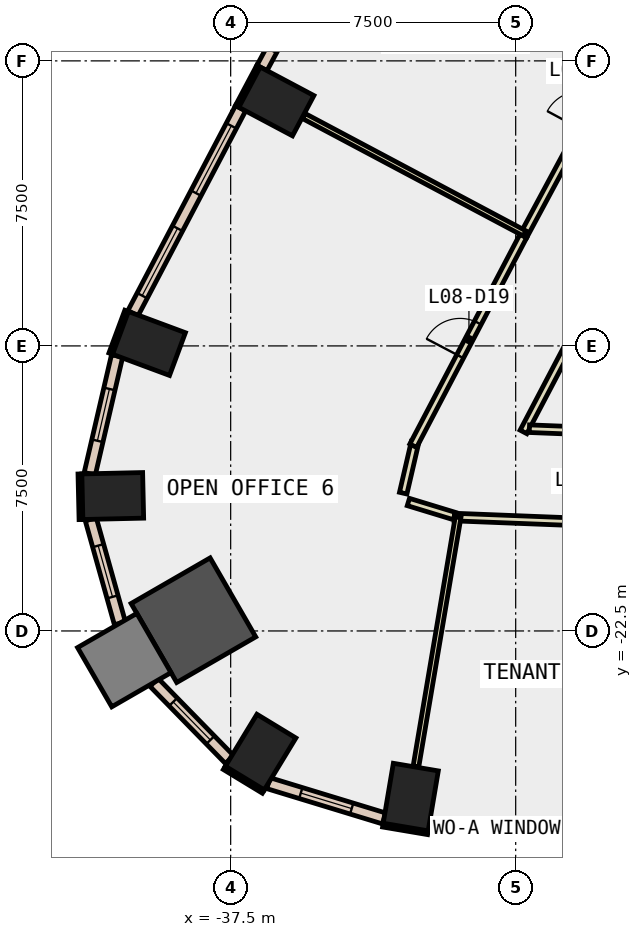
"""IFC4 building model, lengths in metres.
Left out: names, types, materials, properties, quantities, classifications, styles, units other than length and angle.
Written with IfcOpenShell. Run it as: python <this file> out.ifc"""

import sys

from ifc_helpers import new_model, si_unit, direction, frame, frame_2d, origin, origin_2d, place, context, subcontext, project, spatial, rectangle, extrude, element, fill, save


model = new_model("IFC4")
c1 = context("Model", 3, precision=1e-05, world=origin(), true_north=direction((0.0, 1.0)))
c2 = subcontext(c1, "Body", "Model", "MODEL_VIEW")
j1 = project(units=[si_unit("LENGTHUNIT", "METRE"), si_unit("PLANEANGLEUNIT", "RADIAN")], contexts=[c1])
p1 = place(None, origin())
s1 = spatial("IfcSite", under=j1, at=p1, CompositionType="ELEMENT")
p2 = place(p1, origin())
s2 = spatial("IfcBuilding", under=s1, at=p2, CompositionType="ELEMENT")
p3 = place(p2, frame((0.0, 0.0, 43.4)))
s3 = spatial("IfcBuildingStorey", under=s2, at=p3, CompositionType="ELEMENT", Elevation=43.4)
for number, where, z_axis, x_axis in (
    (1, (-32.761, -26.871, -0.4), (0.0, 0.0, 1.0), (-0.986, 0.167, 0.0)),
    (2, (-36.298, -8.567, -0.4), (0.0, 0.0, 1.0), (0.469, 0.883, 0.0)),
    (3, (-39.65, -14.936, -0.4), (0.0, 0.0, 1.0), (0.348, 0.937, 0.0)),
    (4, (-40.603, -18.95, -0.4), (0.0, 0.0, 1.0), (-0.023, 1.0, 0.0)),
):
    element("IfcColumn", number, at=place(p3, frame(where, z_axis=z_axis, x_axis=x_axis)), inside=s3, PredefinedType="COLUMN", context=c2, shape_type="SweptSolid", body=[
        extrude(rectangle(XDim=1.2, YDim=1.6, at=origin_2d()), origin(), (0.0, 0.0, 1.0), 4.2),
    ])
p4 = place(p3, frame((-38.48, -22.217, -0.4), z_axis=(0.0, 0.0, 1.0), x_axis=(0.866025403784, 0.5, 0.0)))
e5 = element("IfcColumn", 5, at=p4, inside=s3, PredefinedType="COLUMN", context=c2, shape_type="SweptSolid", body=[
    extrude(rectangle(XDim=2.4, YDim=2.4, at=origin_2d()), origin(), (0.0, 0.0, 1.0), 4.2),
])
p5 = place(p3, frame((-36.712, -25.688, -0.4), z_axis=(0.0, 0.0, 1.0), x_axis=(-0.854522294989, 0.519414716163, 0.0)))
e6 = element("IfcColumn", 6, at=p5, inside=s3, PredefinedType="COLUMN", context=c2, shape_type="SweptSolid", body=[
    extrude(rectangle(XDim=1.2, YDim=1.6, at=origin_2d()), origin(), (0.0, 0.0, 1.0), 4.2),
])
p6 = place(p3, frame((-40.299, -23.267, -0.4), z_axis=(0.0, 0.0, 1.0), x_axis=(0.866025403784, 0.5, 0.0)))
e7 = element("IfcColumn", 7, at=p6, inside=s3, PredefinedType="COLUMN", context=c2, shape_type="SweptSolid", body=[
    extrude(rectangle(XDim=1.8, YDim=1.8, at=origin_2d()), origin(), (0.0, 0.0, 1.0), 4.2),
])
p7 = place(p3, frame((-36.767, -7.639, 0.0), z_axis=(0.0, 0.0, 1.0), x_axis=(-0.469383408131, -0.882994459876, 0.0)))
e8 = element("IfcWall", 8, at=p7, inside=s3, PredefinedType="STANDARD", context=c2, shape_type="SweptSolid", body=[
    extrude(rectangle(XDim=1.199, YDim=0.1, at=frame_2d((0.6, 0.0))), origin(), (0.0, 0.0, 1.0), 3.8),
])
p8 = place(p3, frame((-40.238, -14.078, 0.0), z_axis=(0.0, 0.0, 1.0), x_axis=(-0.348268249601, -0.937394914814, 0.0)))
e9 = element("IfcWall", 9, at=p8, inside=s3, PredefinedType="STANDARD", context=c2, shape_type="SweptSolid", body=[
    extrude(rectangle(XDim=1.2, YDim=0.1, at=frame_2d((0.6, 0.0))), origin(), (0.0, 0.0, 1.0), 3.8),
])
p9 = place(p3, frame((-33.494, -27.609, 0.0), z_axis=(0.0, 0.0, 1.0), x_axis=(0.98597830993, -0.166873522011, 0.0)))
e10 = element("IfcWall", 10, at=p9, inside=s3, PredefinedType="STANDARD", context=c2, shape_type="SweptSolid", body=[
    extrude(rectangle(XDim=1.2, YDim=0.1, at=frame_2d((0.6, 0.0))), origin(), (0.0, 0.0, 1.0), 3.8),
])
for number, where, z_axis, x_axis in (
    (11, (-41.467, -18.369, 0.0), (0.0, 0.0, 1.0), (0.023, -1.0, 0.0)),
    (12, (-37.666, -26.103, 0.0), (0.0, 0.0, 1.0), (0.855, -0.519, 0.0)),
):
    element("IfcWall", number, at=place(p3, frame(where, z_axis=z_axis, x_axis=x_axis)), inside=s3, PredefinedType="STANDARD", context=c2, shape_type="SweptSolid", body=[
        extrude(rectangle(XDim=1.2, YDim=0.1, at=frame_2d((0.6, 0.0))), origin(), (0.0, 0.0, 1.0), 3.8),
    ])
p10 = place(p3, frame((-32.282, -27.633, 0.0), z_axis=(0.0, 0.0, 1.0), x_axis=(0.999228146648, -0.039282450878, 0.0)))
e13 = element("IfcWall", 13, at=p10, inside=s3, PredefinedType="STANDARD", context=c2, shape_type="SweptSolid", body=[
    extrude(rectangle(XDim=7.154, YDim=0.3, at=frame_2d((3.577, 0.0))), origin(), (0.0, 0.0, 1.0), 3.8),
])
p11 = place(p10, frame((0.588, 0.0, 0.9)))
e14 = element("IfcOpeningElement", 14, at=p11, cuts=e13, PredefinedType="OPENING", context=c2, shape_type="SweptSolid", body=[
    extrude(rectangle(XDim=2.4, YDim=2.6, at=frame_2d((1.2, 1.3))), frame((0.0, 0.16, 0.0), z_axis=(0.0, -1.0, 0.0), x_axis=(1.0, 0.0, 0.0)), (0.0, 0.0, 1.0), 0.32),
])
p12 = place(p10, frame((4.165, 0.0, 0.9)))
e15 = element("IfcOpeningElement", 15, at=p12, cuts=e13, PredefinedType="OPENING", context=c2, shape_type="SweptSolid", body=[
    extrude(rectangle(XDim=2.4, YDim=2.6, at=frame_2d((1.2, 1.3))), frame((0.0, 0.16, 0.0), z_axis=(0.0, -1.0, 0.0), x_axis=(1.0, 0.0, 0.0)), (0.0, 0.0, 1.0), 0.32),
])
p13 = place(p3, frame((-33.779, -2.301, 0.0), z_axis=(0.0, 0.0, 1.0), x_axis=(-0.47375467653, -0.880656860795, 0.0)))
e16 = element("IfcWall", 16, at=p13, inside=s3, PredefinedType="STANDARD", context=c2, shape_type="SweptSolid", body=[
    extrude(rectangle(XDim=6.117, YDim=0.3, at=frame_2d((3.059, 0.0))), origin(), (0.0, 0.0, 1.0), 3.8),
])
p14 = place(p13, frame((0.529, 0.0, 0.9)))
e17 = element("IfcOpeningElement", 17, at=p14, cuts=e16, PredefinedType="OPENING", context=c2, shape_type="SweptSolid", body=[
    extrude(rectangle(XDim=2.0, YDim=2.6, at=frame_2d((1.0, 1.3))), frame((0.0, 0.16, 0.0), z_axis=(0.0, -1.0, 0.0), x_axis=(1.0, 0.0, 0.0)), (0.0, 0.0, 1.0), 0.32),
])
p15 = place(p13, frame((3.588, 0.0, 0.9)))
e18 = element("IfcOpeningElement", 18, at=p15, cuts=e16, PredefinedType="OPENING", context=c2, shape_type="SweptSolid", body=[
    extrude(rectangle(XDim=2.0, YDim=2.6, at=frame_2d((1.0, 1.3))), frame((0.0, 0.16, 0.0), z_axis=(0.0, -1.0, 0.0), x_axis=(1.0, 0.0, 0.0)), (0.0, 0.0, 1.0), 0.32),
])
p16 = place(p3, frame((-37.239, -8.746, 0.0), z_axis=(0.0, 0.0, 1.0), x_axis=(-0.464913987781, -0.885355851602, 0.0)))
e19 = element("IfcWall", 19, at=p16, inside=s3, PredefinedType="STANDARD", context=c2, shape_type="SweptSolid", body=[
    extrude(rectangle(XDim=6.094, YDim=0.3, at=frame_2d((3.047, 0.0))), origin(), (0.0, 0.0, 1.0), 3.8),
])
p17 = place(p16, frame((0.523, 0.0, 0.9)))
e20 = element("IfcOpeningElement", 20, at=p17, cuts=e19, PredefinedType="OPENING", context=c2, shape_type="SweptSolid", body=[
    extrude(rectangle(XDim=2.0, YDim=2.6, at=frame_2d((1.0, 1.3))), frame((0.0, 0.16, 0.0), z_axis=(0.0, -1.0, 0.0), x_axis=(1.0, 0.0, 0.0)), (0.0, 0.0, 1.0), 0.32),
])
p18 = place(p16, frame((3.57, 0.0, 0.9)))
e21 = element("IfcOpeningElement", 21, at=p18, cuts=e19, PredefinedType="OPENING", context=c2, shape_type="SweptSolid", body=[
    extrude(rectangle(XDim=2.0, YDim=2.6, at=frame_2d((1.0, 1.3))), frame((0.0, 0.16, 0.0), z_axis=(0.0, -1.0, 0.0), x_axis=(1.0, 0.0, 0.0)), (0.0, 0.0, 1.0), 0.32),
])
p19 = place(p3, frame((-40.489, -15.264, 0.0), z_axis=(0.0, 0.0, 1.0), x_axis=(-0.225929520451, -0.974143650489, 0.0)))
e22 = element("IfcWall", 22, at=p19, inside=s3, PredefinedType="STANDARD", context=c2, shape_type="SweptSolid", body=[
    extrude(rectangle(XDim=3.182, YDim=0.3, at=frame_2d((1.591, 0.0))), origin(), (0.0, 0.0, 1.0), 3.8),
])
p20 = place(p19, frame((0.891, 0.0, 0.9)))
e23 = element("IfcOpeningElement", 23, at=p20, cuts=e22, PredefinedType="OPENING", context=c2, shape_type="SweptSolid", body=[
    extrude(rectangle(XDim=1.4, YDim=2.6, at=frame_2d((0.7, 1.3))), frame((0.0, 0.16, 0.0), z_axis=(0.0, -1.0, 0.0), x_axis=(1.0, 0.0, 0.0)), (0.0, 0.0, 1.0), 0.32),
])
p21 = place(p3, frame((-41.181, -19.562, 0.0), z_axis=(0.0, 0.0, 1.0), x_axis=(0.269754317033, -0.962929181426, 0.0)))
e24 = element("IfcWall", 24, at=p21, inside=s3, PredefinedType="STANDARD", context=c2, shape_type="SweptSolid", body=[
    extrude(rectangle(XDim=2.839, YDim=0.3, at=frame_2d((1.419, 0.0))), origin(), (0.0, 0.0, 1.0), 3.8),
])
p22 = place(p21, frame((0.72, 0.0, 0.9)))
e25 = element("IfcOpeningElement", 25, at=p22, cuts=e24, PredefinedType="OPENING", context=c2, shape_type="SweptSolid", body=[
    extrude(rectangle(XDim=1.4, YDim=2.6, at=frame_2d((0.7, 1.3))), frame((0.0, 0.16, 0.0), z_axis=(0.0, -1.0, 0.0), x_axis=(1.0, 0.0, 0.0)), (0.0, 0.0, 1.0), 0.32),
])
p23 = place(p3, frame((-39.516, -23.853, 0.0), z_axis=(0.0, 0.0, 1.0), x_axis=(0.699151821451, -0.714973237654, 0.0)))
e26 = element("IfcWall", 26, at=p23, inside=s3, PredefinedType="STANDARD", context=c2, shape_type="SweptSolid", body=[
    extrude(rectangle(XDim=2.839, YDim=0.3, at=frame_2d((1.42, 0.0))), origin(), (0.0, 0.0, 1.0), 3.8),
])
p24 = place(p23, frame((0.72, 0.0, 0.9)))
e27 = element("IfcOpeningElement", 27, at=p24, cuts=e26, PredefinedType="OPENING", context=c2, shape_type="SweptSolid", body=[
    extrude(rectangle(XDim=1.4, YDim=2.6, at=frame_2d((0.7, 1.3))), frame((0.0, 0.16, 0.0), z_axis=(0.0, -1.0, 0.0), x_axis=(1.0, 0.0, 0.0)), (0.0, 0.0, 1.0), 0.32),
])
p25 = place(p3, frame((-36.507, -26.505, 0.0), z_axis=(0.0, 0.0, 1.0), x_axis=(0.95648967224, -0.291766185322, 0.0)))
e28 = element("IfcWall", 28, at=p25, inside=s3, PredefinedType="STANDARD", context=c2, shape_type="SweptSolid", body=[
    extrude(rectangle(XDim=3.181, YDim=0.3, at=frame_2d((1.591, 0.0))), origin(), (0.0, 0.0, 1.0), 3.8),
])
p26 = place(p25, frame((0.891, 0.0, 0.9)))
e29 = element("IfcOpeningElement", 29, at=p26, cuts=e28, PredefinedType="OPENING", context=c2, shape_type="SweptSolid", body=[
    extrude(rectangle(XDim=1.4, YDim=2.6, at=frame_2d((0.7, 1.3))), frame((0.0, 0.16, 0.0), z_axis=(0.0, -1.0, 0.0), x_axis=(1.0, 0.0, 0.0)), (0.0, 0.0, 1.0), 0.32),
])
p27 = place(p3, frame((-27.644, -13.167, 0.0), z_axis=(0.0, 0.0, 1.0), x_axis=(-0.464919738277, -0.885352831904, 0.0)))
e30 = element("IfcWall", 30, at=p27, inside=s3, PredefinedType="PARTITIONING", context=c2, shape_type="SweptSolid", body=[
    extrude(rectangle(XDim=4.626, YDim=0.2, at=frame_2d((2.313, 0.0))), origin(), (0.0, 0.0, 1.0), 3.8),
])
p28 = place(p3, frame((-29.639, -17.178, 0.0), z_axis=(0.0, 0.0, 1.0), x_axis=(0.999228076722, -0.039284229546, 0.0)))
e31 = element("IfcWall", 31, at=p28, inside=s3, PredefinedType="PARTITIONING", context=c2, shape_type="SweptSolid", body=[
    extrude(rectangle(XDim=4.021, YDim=0.2, at=frame_2d((2.01, 0.0))), origin(), (0.0, 0.0, 1.0), 3.8),
])
p29 = place(p3, frame((-29.799, -12.106, 0.0), z_axis=(0.0, 0.0, 1.0), x_axis=(0.473681086062, 0.880696445268, 0.0)))
e32 = element("IfcWall", 32, at=p29, inside=s3, PredefinedType="PARTITIONING", context=c2, shape_type="SweptSolid", body=[
    extrude(rectangle(XDim=7.233, YDim=0.2, at=frame_2d((3.616, 0.0))), origin(), (0.0, 0.0, 1.0), 3.8),
])
p30 = place(p29, frame((3.191, 0.0, 0.0)))
e33 = element("IfcOpeningElement", 33, at=p30, cuts=e32, PredefinedType="OPENING", context=c2, shape_type="SweptSolid", body=[
    extrude(rectangle(XDim=1.0, YDim=2.1, at=frame_2d((0.5, 1.05))), frame((0.0, 0.11, 0.0), z_axis=(0.0, -1.0, 0.0), x_axis=(1.0, 0.0, 0.0)), (0.0, 0.0, 1.0), 0.22),
])
p31 = place(p3, frame((-31.611, -19.477, 0.0), z_axis=(0.0, 0.0, 1.0), x_axis=(-0.956459113118, 0.291866347723, 0.0)))
e34 = element("IfcWall", 34, at=p31, inside=s3, PredefinedType="PARTITIONING", context=c2, shape_type="SweptSolid", body=[
    extrude(rectangle(XDim=1.268, YDim=0.2, at=frame_2d((0.634, 0.0))), origin(), (0.0, 0.0, 1.0), 3.8),
])
p32 = place(p3, frame((-32.96, -18.874, 0.0), z_axis=(0.0, 0.0, 1.0), x_axis=(0.226081445763, 0.974108402531, 0.0)))
e35 = element("IfcWall", 35, at=p32, inside=s3, PredefinedType="PARTITIONING", context=c2, shape_type="SweptSolid", body=[
    extrude(rectangle(XDim=1.371, YDim=0.2, at=frame_2d((0.686, 0.0))), origin(), (0.0, 0.0, 1.0), 3.8),
])
p33 = place(p3, frame((-32.696, -17.626, 0.0), z_axis=(0.0, 0.0, 1.0), x_axis=(0.464767882002, 0.885432558617, 0.0)))
e36 = element("IfcWall", 36, at=p33, inside=s3, PredefinedType="PARTITIONING", context=c2, shape_type="SweptSolid", body=[
    extrude(rectangle(XDim=6.233, YDim=0.2, at=frame_2d((3.117, 0.0))), origin(), (0.0, 0.0, 1.0), 3.8),
])
p34 = place(p33, frame((2.654, 0.0, 0.0)))
e37 = element("IfcOpeningElement", 37, at=p34, cuts=e36, PredefinedType="OPENING", context=c2, shape_type="SweptSolid", body=[
    extrude(rectangle(XDim=1.0, YDim=2.1, at=frame_2d((0.5, 1.05))), frame((0.0, 0.11, 0.0), z_axis=(0.0, -1.0, 0.0), x_axis=(1.0, 0.0, 0.0)), (0.0, 0.0, 1.0), 0.22),
])
p35 = place(p3, frame((-24.186, -19.795, 0.0), z_axis=(0.0, 0.0, 1.0), x_axis=(-0.9992284676, 0.039274285953, 0.0)))
e38 = element("IfcWall", 38, at=p35, inside=s3, PredefinedType="PARTITIONING", context=c2, shape_type="SweptSolid", body=[
    extrude(rectangle(XDim=7.435, YDim=0.2, at=frame_2d((3.717, 0.0))), origin(), (0.0, 0.0, 1.0), 3.8),
])
p36 = place(p35, frame((3.217, 0.0, 0.0)))
e39 = element("IfcOpeningElement", 39, at=p36, cuts=e38, PredefinedType="OPENING", context=c2, shape_type="SweptSolid", body=[
    extrude(rectangle(XDim=1.0, YDim=2.1, at=frame_2d((0.5, 1.05))), frame((0.0, 0.11, 0.0), z_axis=(0.0, -1.0, 0.0), x_axis=(1.0, 0.0, 0.0)), (0.0, 0.0, 1.0), 0.22),
])
p37 = place(p3, frame((-29.764, -12.04, 0.0), z_axis=(0.0, 0.0, 1.0), x_axis=(-0.883018657393, 0.469337885426, 0.0)))
e40 = element("IfcWall", 40, at=p37, inside=s3, PredefinedType="PARTITIONING", context=c2, shape_type="SweptSolid", body=[
    extrude(rectangle(XDim=6.58, YDim=0.15, at=frame_2d((3.29, 0.0))), origin(), (0.0, 0.0, 1.0), 3.8),
])
p38 = place(p3, frame((-31.515, -19.506, 0.0), z_axis=(0.0, 0.0, 1.0), x_axis=(-0.166785823947, -0.985993148521, 0.0)))
e41 = element("IfcWall", 41, at=p38, inside=s3, PredefinedType="PARTITIONING", context=c2, shape_type="SweptSolid", body=[
    extrude(rectangle(XDim=6.65, YDim=0.15, at=frame_2d((3.325, 0.0))), origin(), (0.0, 0.0, 1.0), 3.8),
])
p39 = place(p11, origin())
e42 = element("IfcWindow", 42, at=p39, inside=s3, PartitioningType="SINGLE_PANEL", PredefinedType="WINDOW", context=c2, shape_type="SweptSolid", body=[
    extrude(rectangle(XDim=2.4, YDim=2.6, at=frame_2d((1.2, 1.3))), frame((0.0, 0.03, 0.0), z_axis=(0.0, -1.0, 0.0), x_axis=(1.0, 0.0, 0.0)), (0.0, 0.0, 1.0), 0.06),
])
fill(e14, e42)
p40 = place(p17, origin())
e43 = element("IfcWindow", 43, at=p40, inside=s3, PartitioningType="SINGLE_PANEL", PredefinedType="WINDOW", context=c2, shape_type="SweptSolid", body=[
    extrude(rectangle(XDim=2.0, YDim=2.6, at=frame_2d((1.0, 1.3))), frame((0.0, 0.03, 0.0), z_axis=(0.0, -1.0, 0.0), x_axis=(1.0, 0.0, 0.0)), (0.0, 0.0, 1.0), 0.06),
])
fill(e20, e43)
p41 = place(p18, origin())
e44 = element("IfcWindow", 44, at=p41, inside=s3, PartitioningType="SINGLE_PANEL", PredefinedType="WINDOW", context=c2, shape_type="SweptSolid", body=[
    extrude(rectangle(XDim=2.0, YDim=2.6, at=frame_2d((1.0, 1.3))), frame((0.0, 0.03, 0.0), z_axis=(0.0, -1.0, 0.0), x_axis=(1.0, 0.0, 0.0)), (0.0, 0.0, 1.0), 0.06),
])
fill(e21, e44)
p42 = place(p20, origin())
e45 = element("IfcWindow", 45, at=p42, inside=s3, PartitioningType="SINGLE_PANEL", PredefinedType="WINDOW", context=c2, shape_type="SweptSolid", body=[
    extrude(rectangle(XDim=1.4, YDim=2.6, at=frame_2d((0.7, 1.3))), frame((0.0, 0.03, 0.0), z_axis=(0.0, -1.0, 0.0), x_axis=(1.0, 0.0, 0.0)), (0.0, 0.0, 1.0), 0.06),
])
fill(e23, e45)
p43 = place(p22, origin())
e46 = element("IfcWindow", 46, at=p43, inside=s3, PartitioningType="SINGLE_PANEL", PredefinedType="WINDOW", context=c2, shape_type="SweptSolid", body=[
    extrude(rectangle(XDim=1.4, YDim=2.6, at=frame_2d((0.7, 1.3))), frame((0.0, 0.03, 0.0), z_axis=(0.0, -1.0, 0.0), x_axis=(1.0, 0.0, 0.0)), (0.0, 0.0, 1.0), 0.06),
])
fill(e25, e46)
p44 = place(p24, origin())
e47 = element("IfcWindow", 47, at=p44, inside=s3, PartitioningType="SINGLE_PANEL", PredefinedType="WINDOW", context=c2, shape_type="SweptSolid", body=[
    extrude(rectangle(XDim=1.4, YDim=2.6, at=frame_2d((0.7, 1.3))), frame((0.0, 0.03, 0.0), z_axis=(0.0, -1.0, 0.0), x_axis=(1.0, 0.0, 0.0)), (0.0, 0.0, 1.0), 0.06),
])
fill(e27, e47)
p45 = place(p26, origin())
e48 = element("IfcWindow", 48, at=p45, inside=s3, PartitioningType="SINGLE_PANEL", PredefinedType="WINDOW", context=c2, shape_type="SweptSolid", body=[
    extrude(rectangle(XDim=1.4, YDim=2.6, at=frame_2d((0.7, 1.3))), frame((0.0, 0.03, 0.0), z_axis=(0.0, -1.0, 0.0), x_axis=(1.0, 0.0, 0.0)), (0.0, 0.0, 1.0), 0.06),
])
fill(e29, e48)
p46 = place(p34, origin())
e49 = element("IfcDoor", 49, at=p46, inside=s3, OperationType="SINGLE_SWING_RIGHT", PredefinedType="DOOR", context=c2, shape_type="SweptSolid", body=[
    extrude(rectangle(XDim=1.0, YDim=2.1, at=frame_2d((0.5, 1.05))), frame((0.0, 0.025, 0.0), z_axis=(0.0, -1.0, 0.0), x_axis=(1.0, 0.0, 0.0)), (0.0, 0.0, 1.0), 0.05),
])
fill(e37, e49)
save(model, sys.argv[1])
